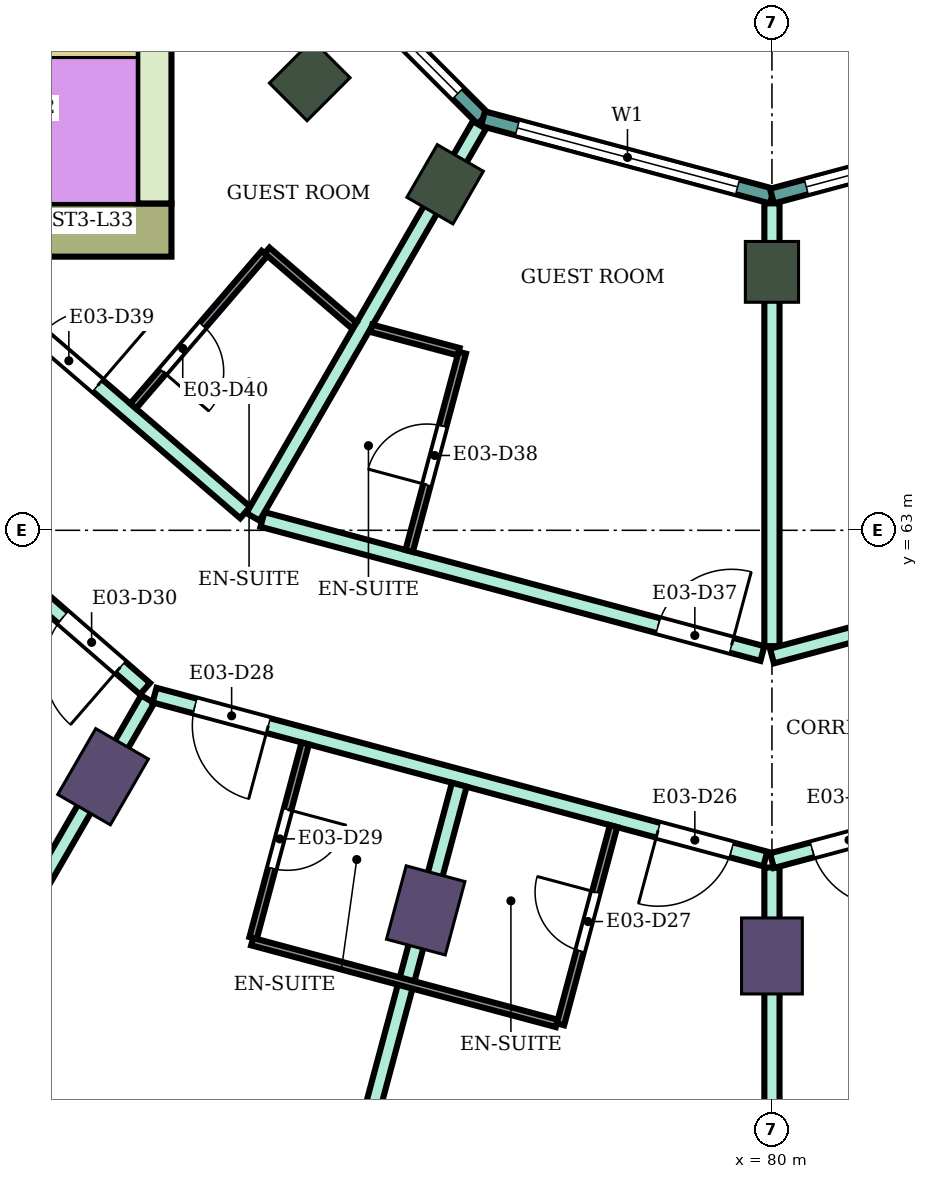
"""IFC4 building model, lengths in metres.
Left out: names, types, materials, properties, quantities, classifications, styles, units other than length and angle.
Written with IfcOpenShell. Run it as: python <this file> out.ifc"""

import sys

from ifc_helpers import new_model, si_unit, direction, frame, frame_2d, origin, origin_2d, place, context, subcontext, project, spatial, rectangle, extrude, element, fill, save


model = new_model("IFC4")
c1 = context("Model", 3, precision=1e-05, world=origin(), true_north=direction((0.0, 1.0)))
c2 = subcontext(c1, "Body", "Model", "MODEL_VIEW")
j1 = project(units=[si_unit("LENGTHUNIT", "METRE"), si_unit("PLANEANGLEUNIT", "RADIAN")], contexts=[c1])
p1 = place(None, origin())
s1 = spatial("IfcSite", under=j1, at=p1, CompositionType="ELEMENT")
p2 = place(p1, origin())
s2 = spatial("IfcBuilding", under=s1, at=p2, CompositionType="ELEMENT")
p3 = place(p2, frame((0.0, 0.0, 141.9)))
s3 = spatial("IfcBuildingStorey", under=s2, at=p3, CompositionType="ELEMENT", Elevation=141.9)
for number, where, z_axis, x_axis in (
    (1, (71.2, 59.758, 0.0), (0.0, 0.0, 1.0), (-0.5, -0.866, 0.0)),
    (2, (75.445, 58.0, 0.0), (0.0, 0.0, 1.0), (-0.259, -0.966, 0.0)),
    (3, (80.0, 57.4, 0.0), (0.0, 0.0, 1.0), (0.0, -1.0, 0.0)),
):
    element("IfcColumn", number, at=place(p3, frame(where, z_axis=z_axis, x_axis=x_axis)), inside=s3, PredefinedType="COLUMN", context=c2, shape_type="SweptSolid", body=[
        extrude(rectangle(XDim=1.0, YDim=0.8, at=origin_2d()), origin(), (0.0, 0.0, 1.0), 3.9),
    ])
for number, where, z_axis, x_axis in (
    (4, (73.919, 68.919, 0.0), (0.0, 0.0, 1.0), (-0.707, -0.707, 0.0)),
    (5, (75.7, 67.552, 0.0), (0.0, 0.0, 1.0), (-0.5, -0.866, 0.0)),
    (6, (80.0, 66.4, 0.0), (0.0, 0.0, 1.0), (0.0, -1.0, 0.0)),
):
    element("IfcColumn", number, at=place(p3, frame(where, z_axis=z_axis, x_axis=x_axis)), inside=s3, PredefinedType="COLUMN", context=c2, shape_type="SweptSolid", body=[
        extrude(rectangle(XDim=0.8, YDim=0.7, at=origin_2d()), origin(), (0.0, 0.0, 1.0), 3.9),
    ])
p4 = place(p3, frame((72.1, 66.95, 0.0), z_axis=(0.0, 0.0, 1.0), x_axis=(-1.0, 0.0, 0.0)))
e7 = element("IfcWall", 7, at=p4, inside=s3, PredefinedType="SHEAR", context=c2, shape_type="SweptSolid", body=[
    extrude(rectangle(XDim=14.8, YDim=0.7, at=frame_2d((7.4, 0.0))), origin(), (0.0, 0.0, 1.0), 3.58),
])
p5 = place(p4, frame((4.2, 0.0, 0.0)))
e8 = element("IfcOpeningElement", 8, at=p5, cuts=e7, PredefinedType="OPENING", context=c2, shape_type="SweptSolid", body=[
    extrude(rectangle(XDim=2.4, YDim=2.4, at=frame_2d((1.2, 1.2))), frame((0.0, 0.36, 0.0), z_axis=(0.0, -1.0, 0.0), x_axis=(1.0, 0.0, 0.0)), (0.0, 0.0, 1.0), 0.72),
])
p6 = place(p3, frame((71.875, 75.0, 0.0), z_axis=(0.0, 0.0, 1.0), x_axis=(0.0, -1.0, 0.0)))
e9 = element("IfcWall", 9, at=p6, inside=s3, PredefinedType="SHEAR", context=c2, shape_type="SweptSolid", body=[
    extrude(rectangle(XDim=7.7, YDim=0.45, at=frame_2d((3.85, 0.0))), origin(), (0.0, 0.0, 1.0), 3.58),
])
p7 = place(p3, frame((73.415, 71.198, 0.0), z_axis=(0.0, 0.0, 1.0), x_axis=(0.707106781187, -0.707106781187, 0.0)))
e10 = element("IfcWall", 10, at=p7, inside=s3, PredefinedType="NOTDEFINED", context=c2, shape_type="SweptSolid", body=[
    extrude(rectangle(XDim=3.936, YDim=0.2, at=frame_2d((1.968, 0.0))), origin(), (0.0, 0.0, 1.0), 3.9),
])
p8 = place(p7, frame((0.468, 0.0, 0.9)))
e11 = element("IfcOpeningElement", 11, at=p8, cuts=e10, PredefinedType="OPENING", context=c2, shape_type="SweptSolid", body=[
    extrude(rectangle(XDim=3.0, YDim=2.3, at=frame_2d((1.5, 1.15))), frame((0.0, 0.11, 0.0), z_axis=(0.0, -1.0, 0.0), x_axis=(1.0, 0.0, 0.0)), (0.0, 0.0, 1.0), 0.22),
])
p9 = place(p3, frame((76.198, 68.415, 0.0), z_axis=(0.0, 0.0, 1.0), x_axis=(0.965933654434, -0.258789828301, 0.0)))
e12 = element("IfcWall", 12, at=p9, inside=s3, PredefinedType="NOTDEFINED", context=c2, shape_type="SweptSolid", body=[
    extrude(rectangle(XDim=3.936, YDim=0.2, at=frame_2d((1.968, 0.0))), origin(), (0.0, 0.0, 1.0), 3.9),
])
p10 = place(p9, frame((0.468, 0.0, 0.9)))
e13 = element("IfcOpeningElement", 13, at=p10, cuts=e12, PredefinedType="OPENING", context=c2, shape_type="SweptSolid", body=[
    extrude(rectangle(XDim=3.0, YDim=2.3, at=frame_2d((1.5, 1.15))), frame((0.0, 0.11, 0.0), z_axis=(0.0, -1.0, 0.0), x_axis=(1.0, 0.0, 0.0)), (0.0, 0.0, 1.0), 0.22),
])
p11 = place(p3, frame((80.0, 67.396, 0.0), z_axis=(0.0, 0.0, 1.0), x_axis=(0.965933654434, 0.258789828301, 0.0)))
e14 = element("IfcWall", 14, at=p11, inside=s3, PredefinedType="NOTDEFINED", context=c2, shape_type="SweptSolid", body=[
    extrude(rectangle(XDim=3.936, YDim=0.2, at=frame_2d((1.968, 0.0))), origin(), (0.0, 0.0, 1.0), 3.9),
])
p12 = place(p11, frame((0.468, 0.0, 0.9)))
e15 = element("IfcOpeningElement", 15, at=p12, cuts=e14, PredefinedType="OPENING", context=c2, shape_type="SweptSolid", body=[
    extrude(rectangle(XDim=3.0, YDim=2.3, at=frame_2d((1.5, 1.15))), frame((0.0, 0.11, 0.0), z_axis=(0.0, -1.0, 0.0), x_axis=(1.0, 0.0, 0.0)), (0.0, 0.0, 1.0), 0.22),
])
p13 = place(p3, frame((67.082, 64.972, 0.0), z_axis=(0.0, 0.0, 1.0), x_axis=(0.755031061605, -0.65568902386, 0.0)))
e16 = element("IfcWall", 16, at=p13, inside=s3, PredefinedType="PARTITIONING", context=c2, shape_type="SweptSolid", body=[
    extrude(rectangle(XDim=6.186, YDim=0.2, at=frame_2d((3.093, 0.0))), origin(), (0.0, 0.0, 1.0), 3.45),
])
p14 = place(p13, frame((4.755, 0.0, 0.0)))
e17 = element("IfcOpeningElement", 17, at=p14, cuts=e16, PredefinedType="OPENING", context=c2, shape_type="SweptSolid", body=[
    extrude(rectangle(XDim=1.0, YDim=2.1, at=frame_2d((0.5, 1.05))), frame((0.0, 0.11, 0.0), z_axis=(0.0, -1.0, 0.0), x_axis=(1.0, 0.0, 0.0)), (0.0, 0.0, 1.0), 0.22),
])
p15 = place(p3, frame((67.097, 52.661, 0.0), z_axis=(0.0, 0.0, 1.0), x_axis=(0.500236379769, 0.865888886841, 0.0)))
e18 = element("IfcWall", 18, at=p15, inside=s3, PredefinedType="PARTITIONING", context=c2, shape_type="SweptSolid", body=[
    extrude(rectangle(XDim=9.375, YDim=0.2, at=frame_2d((4.688, 0.0))), origin(), (0.0, 0.0, 1.0), 3.45),
])
p16 = place(p3, frame((69.158, 66.6, 0.0), z_axis=(0.0, 0.0, 1.0), x_axis=(0.757976058094, -0.652282373943, 0.0)))
e19 = element("IfcWall", 19, at=p16, inside=s3, PredefinedType="PARTITIONING", context=c2, shape_type="SweptSolid", body=[
    extrude(rectangle(XDim=5.16, YDim=0.2, at=frame_2d((2.58, 0.0))), origin(), (0.0, 0.0, 1.0), 3.45),
])
p17 = place(p16, frame((1.6, 0.0, 0.0)))
e20 = element("IfcOpeningElement", 20, at=p17, cuts=e19, PredefinedType="OPENING", context=c2, shape_type="SweptSolid", body=[
    extrude(rectangle(XDim=1.0, YDim=2.1, at=frame_2d((0.5, 1.05))), frame((0.0, 0.11, 0.0), z_axis=(0.0, -1.0, 0.0), x_axis=(1.0, 0.0, 0.0)), (0.0, 0.0, 1.0), 0.22),
])
p18 = place(p3, frame((71.877, 60.832, 0.0), z_axis=(0.0, 0.0, 1.0), x_axis=(0.965852509869, -0.259092510851, 0.0)))
e21 = element("IfcWall", 21, at=p18, inside=s3, PredefinedType="PARTITIONING", context=c2, shape_type="SweptSolid", body=[
    extrude(rectangle(XDim=8.32, YDim=0.2, at=frame_2d((4.16, 0.0))), origin(), (0.0, 0.0, 1.0), 3.45),
])
p19 = place(p18, frame((6.86, 0.0, 0.0)))
e22 = element("IfcOpeningElement", 22, at=p19, cuts=e21, PredefinedType="OPENING", context=c2, shape_type="SweptSolid", body=[
    extrude(rectangle(XDim=1.0, YDim=2.1, at=frame_2d((0.5, 1.05))), frame((0.0, 0.11, 0.0), z_axis=(0.0, -1.0, 0.0), x_axis=(1.0, 0.0, 0.0)), (0.0, 0.0, 1.0), 0.22),
])
p20 = place(p18, frame((0.55, 0.0, 0.0)))
e23 = element("IfcOpeningElement", 23, at=p20, cuts=e21, PredefinedType="OPENING", context=c2, shape_type="SweptSolid", body=[
    extrude(rectangle(XDim=1.0, YDim=2.1, at=frame_2d((0.5, 1.05))), frame((0.0, 0.11, 0.0), z_axis=(0.0, -1.0, 0.0), x_axis=(1.0, 0.0, 0.0)), (0.0, 0.0, 1.0), 0.22),
])
p21 = place(p3, frame((73.297, 63.143, 0.0), z_axis=(0.0, 0.0, 1.0), x_axis=(0.965859030528, -0.25906820173, 0.0)))
e24 = element("IfcWall", 24, at=p21, inside=s3, PredefinedType="PARTITIONING", context=c2, shape_type="SweptSolid", body=[
    extrude(rectangle(XDim=6.81, YDim=0.2, at=frame_2d((3.405, 0.0))), origin(), (0.0, 0.0, 1.0), 3.45),
])
p22 = place(p21, frame((5.39, 0.0, 0.0)))
e25 = element("IfcOpeningElement", 25, at=p22, cuts=e24, PredefinedType="OPENING", context=c2, shape_type="SweptSolid", body=[
    extrude(rectangle(XDim=1.0, YDim=2.1, at=frame_2d((0.5, 1.05))), frame((0.0, 0.11, 0.0), z_axis=(0.0, -1.0, 0.0), x_axis=(1.0, 0.0, 0.0)), (0.0, 0.0, 1.0), 0.22),
])
p23 = place(p3, frame((73.173, 63.176, 0.0), z_axis=(0.0, 0.0, 1.0), x_axis=(0.500239348149, 0.865887171959, 0.0)))
e26 = element("IfcWall", 26, at=p23, inside=s3, PredefinedType="PARTITIONING", context=c2, shape_type="SweptSolid", body=[
    extrude(rectangle(XDim=5.955, YDim=0.2, at=frame_2d((2.978, 0.0))), origin(), (0.0, 0.0, 1.0), 3.45),
])
p24 = place(p3, frame((73.321, 50.081, 0.0), z_axis=(0.0, 0.0, 1.0), x_axis=(0.258889198551, 0.965907025999, 0.0)))
e27 = element("IfcWall", 27, at=p24, inside=s3, PredefinedType="PARTITIONING", context=c2, shape_type="SweptSolid", body=[
    extrude(rectangle(XDim=9.909, YDim=0.2, at=frame_2d((4.955, 0.0))), origin(), (0.0, 0.0, 1.0), 3.45),
])
p25 = place(p3, frame((80.0, 51.8, 0.0), z_axis=(0.0, 0.0, 1.0), x_axis=(0.0, 1.0, 0.0)))
e28 = element("IfcWall", 28, at=p25, inside=s3, PredefinedType="PARTITIONING", context=c2, shape_type="SweptSolid", body=[
    extrude(rectangle(XDim=6.764, YDim=0.2, at=frame_2d((3.382, 0.0))), origin(), (0.0, 0.0, 1.0), 3.45),
])
p26 = place(p3, frame((80.0, 58.654, 0.0), z_axis=(0.0, 0.0, 1.0), x_axis=(0.965979808777, 0.25861749561, 0.0)))
e29 = element("IfcWall", 29, at=p26, inside=s3, PredefinedType="PARTITIONING", context=c2, shape_type="SweptSolid", body=[
    extrude(rectangle(XDim=8.37, YDim=0.2, at=frame_2d((4.185, 0.0))), origin(), (0.0, 0.0, 1.0), 3.45),
])
p27 = place(p26, frame((0.55, 0.0, 0.0)))
e30 = element("IfcOpeningElement", 30, at=p27, cuts=e29, PredefinedType="OPENING", context=c2, shape_type="SweptSolid", body=[
    extrude(rectangle(XDim=1.0, YDim=2.1, at=frame_2d((0.5, 1.05))), frame((0.0, 0.11, 0.0), z_axis=(0.0, -1.0, 0.0), x_axis=(1.0, 0.0, 0.0)), (0.0, 0.0, 1.0), 0.22),
])
p28 = place(p3, frame((80.0, 61.476, 0.0), z_axis=(0.0, 0.0, 1.0), x_axis=(0.0, 1.0, 0.0)))
e31 = element("IfcWall", 31, at=p28, inside=s3, PredefinedType="PARTITIONING", context=c2, shape_type="SweptSolid", body=[
    extrude(rectangle(XDim=5.825, YDim=0.2, at=frame_2d((2.913, 0.0))), origin(), (0.0, 0.0, 1.0), 3.45),
])
p29 = place(p3, frame((80.0, 61.346, 0.0), z_axis=(0.0, 0.0, 1.0), x_axis=(0.965915385935, 0.25885800589, 0.0)))
e32 = element("IfcWall", 32, at=p29, inside=s3, PredefinedType="PARTITIONING", context=c2, shape_type="SweptSolid", body=[
    extrude(rectangle(XDim=6.94, YDim=0.2, at=frame_2d((3.47, 0.0))), origin(), (0.0, 0.0, 1.0), 3.45),
])
p30 = place(p29, frame((3.094, 0.0, 0.0)))
e33 = element("IfcOpeningElement", 33, at=p30, cuts=e32, PredefinedType="OPENING", context=c2, shape_type="SweptSolid", body=[
    extrude(rectangle(XDim=0.9, YDim=2.1, at=frame_2d((0.45, 1.05))), frame((0.0, 0.11, 0.0), z_axis=(0.0, -1.0, 0.0), x_axis=(1.0, 0.0, 0.0)), (0.0, 0.0, 1.0), 0.22),
])
p31 = place(p3, frame((71.596, 64.635, 0.0), z_axis=(0.0, 0.0, 1.0), x_axis=(0.652285007511, 0.757973791748, 0.0)))
e34 = element("IfcWall", 34, at=p31, inside=s3, PredefinedType="PARTITIONING", context=c2, shape_type="SweptSolid", body=[
    extrude(rectangle(XDim=2.65, YDim=0.1, at=frame_2d((1.325, 0.0))), origin(), (0.0, 0.0, 1.0), 3.45),
])
p32 = place(p31, frame((0.6, 0.0, 0.0)))
e35 = element("IfcOpeningElement", 35, at=p32, cuts=e34, PredefinedType="OPENING", context=c2, shape_type="SweptSolid", body=[
    extrude(rectangle(XDim=0.8, YDim=2.1, at=frame_2d((0.4, 1.05))), frame((0.0, 0.06, 0.0), z_axis=(0.0, -1.0, 0.0), x_axis=(1.0, 0.0, 0.0)), (0.0, 0.0, 1.0), 0.12),
])
p33 = place(p3, frame((73.174, 57.636, 0.0), z_axis=(0.0, 0.0, 1.0), x_axis=(0.258952498977, 0.96589005755, 0.0)))
e36 = element("IfcWall", 36, at=p33, inside=s3, PredefinedType="PARTITIONING", context=c2, shape_type="SweptSolid", body=[
    extrude(rectangle(XDim=2.65, YDim=0.1, at=frame_2d((1.325, 0.0))), origin(), (0.0, 0.0, 1.0), 3.45),
])
p34 = place(p33, frame((0.95, 0.0, 0.0)))
e37 = element("IfcOpeningElement", 37, at=p34, cuts=e36, PredefinedType="OPENING", context=c2, shape_type="SweptSolid", body=[
    extrude(rectangle(XDim=0.8, YDim=2.1, at=frame_2d((0.4, 1.05))), frame((0.0, 0.06, 0.0), z_axis=(0.0, -1.0, 0.0), x_axis=(1.0, 0.0, 0.0)), (0.0, 0.0, 1.0), 0.12),
])
p35 = place(p3, frame((73.161, 57.588, 0.0), z_axis=(0.0, 0.0, 1.0), x_axis=(0.965858994467, -0.259068336173, 0.0)))
e38 = element("IfcWall", 38, at=p35, inside=s3, PredefinedType="PARTITIONING", context=c2, shape_type="SweptSolid", body=[
    extrude(rectangle(XDim=4.15, YDim=0.1, at=frame_2d((2.075, 0.0))), origin(), (0.0, 0.0, 1.0), 3.45),
])
p36 = place(p3, frame((73.357, 66.681, 0.0), z_axis=(0.0, 0.0, 1.0), x_axis=(0.758263469747, -0.651948242154, 0.0)))
e39 = element("IfcWall", 39, at=p36, inside=s3, PredefinedType="PARTITIONING", context=c2, shape_type="SweptSolid", body=[
    extrude(rectangle(XDim=1.511, YDim=0.1, at=frame_2d((0.755, 0.0))), origin(), (0.0, 0.0, 1.0), 3.45),
])
p37 = place(p3, frame((74.729, 65.657, 0.0), z_axis=(0.0, 0.0, 1.0), x_axis=(0.965948051503, -0.258736085224, 0.0)))
e40 = element("IfcWall", 40, at=p37, inside=s3, PredefinedType="PARTITIONING", context=c2, shape_type="SweptSolid", body=[
    extrude(rectangle(XDim=1.189, YDim=0.1, at=frame_2d((0.594, 0.0))), origin(), (0.0, 0.0, 1.0), 3.45),
])
p38 = place(p3, frame((75.227, 62.729, 0.0), z_axis=(0.0, 0.0, 1.0), x_axis=(0.258945475746, 0.965891940432, 0.0)))
e41 = element("IfcWall", 41, at=p38, inside=s3, PredefinedType="PARTITIONING", context=c2, shape_type="SweptSolid", body=[
    extrude(rectangle(XDim=2.7, YDim=0.1, at=frame_2d((1.35, 0.0))), origin(), (0.0, 0.0, 1.0), 3.45),
])
p39 = place(p38, frame((0.9, 0.0, 0.0)))
e42 = element("IfcOpeningElement", 42, at=p39, cuts=e41, PredefinedType="OPENING", context=c2, shape_type="SweptSolid", body=[
    extrude(rectangle(XDim=0.8, YDim=2.1, at=frame_2d((0.4, 1.05))), frame((0.0, 0.06, 0.0), z_axis=(0.0, -1.0, 0.0), x_axis=(1.0, 0.0, 0.0)), (0.0, 0.0, 1.0), 0.12),
])
p40 = place(p3, frame((77.218, 56.501, 0.0), z_axis=(0.0, 0.0, 1.0), x_axis=(0.258591408257, 0.965986792651, 0.0)))
e43 = element("IfcWall", 43, at=p40, inside=s3, PredefinedType="PARTITIONING", context=c2, shape_type="SweptSolid", body=[
    extrude(rectangle(XDim=2.699, YDim=0.1, at=frame_2d((1.35, 0.0))), origin(), (0.0, 0.0, 1.0), 3.45),
])
p41 = place(p40, frame((1.0, 0.0, 0.0)))
e44 = element("IfcOpeningElement", 44, at=p41, cuts=e43, PredefinedType="OPENING", context=c2, shape_type="SweptSolid", body=[
    extrude(rectangle(XDim=0.8, YDim=2.1, at=frame_2d((0.4, 1.05))), frame((0.0, 0.06, 0.0), z_axis=(0.0, -1.0, 0.0), x_axis=(1.0, 0.0, 0.0)), (0.0, 0.0, 1.0), 0.12),
])
p42 = place(p8, origin())
e45 = element("IfcWindow", 45, at=p42, inside=s3, PartitioningType="SINGLE_PANEL", PredefinedType="WINDOW", context=c2, shape_type="SweptSolid", body=[
    extrude(rectangle(XDim=3.0, YDim=2.3, at=frame_2d((1.5, 1.15))), frame((0.0, 0.03, 0.0), z_axis=(0.0, -1.0, 0.0), x_axis=(1.0, 0.0, 0.0)), (0.0, 0.0, 1.0), 0.06),
])
fill(e11, e45)
p43 = place(p10, origin())
e46 = element("IfcWindow", 46, at=p43, inside=s3, PartitioningType="SINGLE_PANEL", PredefinedType="WINDOW", context=c2, shape_type="SweptSolid", body=[
    extrude(rectangle(XDim=3.0, YDim=2.3, at=frame_2d((1.5, 1.15))), frame((0.0, 0.03, 0.0), z_axis=(0.0, -1.0, 0.0), x_axis=(1.0, 0.0, 0.0)), (0.0, 0.0, 1.0), 0.06),
])
fill(e13, e46)
p44 = place(p12, origin())
e47 = element("IfcWindow", 47, at=p44, inside=s3, PartitioningType="SINGLE_PANEL", PredefinedType="WINDOW", context=c2, shape_type="SweptSolid", body=[
    extrude(rectangle(XDim=3.0, YDim=2.3, at=frame_2d((1.5, 1.15))), frame((0.0, 0.03, 0.0), z_axis=(0.0, -1.0, 0.0), x_axis=(1.0, 0.0, 0.0)), (0.0, 0.0, 1.0), 0.06),
])
fill(e15, e47)
p45 = place(p27, frame((1.0, 0.0, 0.0), z_axis=(0.0, 0.0, 1.0), x_axis=(-1.0, 0.0, 0.0)))
e48 = element("IfcDoor", 48, at=p45, inside=s3, OperationType="SINGLE_SWING_LEFT", PredefinedType="DOOR", context=c2, shape_type="SweptSolid", body=[
    extrude(rectangle(XDim=1.0, YDim=2.1, at=frame_2d((0.5, 1.05))), frame((0.0, 0.025, 0.0), z_axis=(0.0, -1.0, 0.0), x_axis=(1.0, 0.0, 0.0)), (0.0, 0.0, 1.0), 0.05),
])
fill(e30, e48)
p46 = place(p19, frame((1.0, 0.0, 0.0), z_axis=(0.0, 0.0, 1.0), x_axis=(-1.0, 0.0, 0.0)))
e49 = element("IfcDoor", 49, at=p46, inside=s3, OperationType="SINGLE_SWING_RIGHT", PredefinedType="DOOR", context=c2, shape_type="SweptSolid", body=[
    extrude(rectangle(XDim=1.0, YDim=2.1, at=frame_2d((0.5, 1.05))), frame((0.0, 0.025, 0.0), z_axis=(0.0, -1.0, 0.0), x_axis=(1.0, 0.0, 0.0)), (0.0, 0.0, 1.0), 0.05),
])
fill(e22, e49)
p47 = place(p41, origin())
e50 = element("IfcDoor", 50, at=p47, inside=s3, OperationType="SINGLE_SWING_RIGHT", PredefinedType="DOOR", context=c2, shape_type="SweptSolid", body=[
    extrude(rectangle(XDim=0.8, YDim=2.1, at=frame_2d((0.4, 1.05))), frame((0.0, 0.025, 0.0), z_axis=(0.0, -1.0, 0.0), x_axis=(1.0, 0.0, 0.0)), (0.0, 0.0, 1.0), 0.05),
])
fill(e44, e50)
p48 = place(p20, frame((1.0, 0.0, 0.0), z_axis=(0.0, 0.0, 1.0), x_axis=(-1.0, 0.0, 0.0)))
e51 = element("IfcDoor", 51, at=p48, inside=s3, OperationType="SINGLE_SWING_LEFT", PredefinedType="DOOR", context=c2, shape_type="SweptSolid", body=[
    extrude(rectangle(XDim=1.0, YDim=2.1, at=frame_2d((0.5, 1.05))), frame((0.0, 0.025, 0.0), z_axis=(0.0, -1.0, 0.0), x_axis=(1.0, 0.0, 0.0)), (0.0, 0.0, 1.0), 0.05),
])
fill(e23, e51)
p49 = place(p34, frame((0.8, 0.0, 0.0), z_axis=(0.0, 0.0, 1.0), x_axis=(-1.0, 0.0, 0.0)))
e52 = element("IfcDoor", 52, at=p49, inside=s3, OperationType="SINGLE_SWING_LEFT", PredefinedType="DOOR", context=c2, shape_type="SweptSolid", body=[
    extrude(rectangle(XDim=0.8, YDim=2.1, at=frame_2d((0.4, 1.05))), frame((0.0, 0.025, 0.0), z_axis=(0.0, -1.0, 0.0), x_axis=(1.0, 0.0, 0.0)), (0.0, 0.0, 1.0), 0.05),
])
fill(e37, e52)
p50 = place(p14, frame((1.0, 0.0, 0.0), z_axis=(0.0, 0.0, 1.0), x_axis=(-1.0, 0.0, 0.0)))
e53 = element("IfcDoor", 53, at=p50, inside=s3, OperationType="SINGLE_SWING_LEFT", PredefinedType="DOOR", context=c2, shape_type="SweptSolid", body=[
    extrude(rectangle(XDim=1.0, YDim=2.1, at=frame_2d((0.5, 1.05))), frame((0.0, 0.025, 0.0), z_axis=(0.0, -1.0, 0.0), x_axis=(1.0, 0.0, 0.0)), (0.0, 0.0, 1.0), 0.05),
])
fill(e17, e53)
p51 = place(p22, origin())
e54 = element("IfcDoor", 54, at=p51, inside=s3, OperationType="SINGLE_SWING_RIGHT", PredefinedType="DOOR", context=c2, shape_type="SweptSolid", body=[
    extrude(rectangle(XDim=1.0, YDim=2.1, at=frame_2d((0.5, 1.05))), frame((0.0, 0.025, 0.0), z_axis=(0.0, -1.0, 0.0), x_axis=(1.0, 0.0, 0.0)), (0.0, 0.0, 1.0), 0.05),
])
fill(e25, e54)
p52 = place(p39, origin())
e55 = element("IfcDoor", 55, at=p52, inside=s3, OperationType="SINGLE_SWING_LEFT", PredefinedType="DOOR", context=c2, shape_type="SweptSolid", body=[
    extrude(rectangle(XDim=0.8, YDim=2.1, at=frame_2d((0.4, 1.05))), frame((0.0, 0.025, 0.0), z_axis=(0.0, -1.0, 0.0), x_axis=(1.0, 0.0, 0.0)), (0.0, 0.0, 1.0), 0.05),
])
fill(e42, e55)
p53 = place(p17, origin())
e56 = element("IfcDoor", 56, at=p53, inside=s3, OperationType="SINGLE_SWING_RIGHT", PredefinedType="DOOR", context=c2, shape_type="SweptSolid", body=[
    extrude(rectangle(XDim=1.0, YDim=2.1, at=frame_2d((0.5, 1.05))), frame((0.0, 0.025, 0.0), z_axis=(0.0, -1.0, 0.0), x_axis=(1.0, 0.0, 0.0)), (0.0, 0.0, 1.0), 0.05),
])
fill(e20, e56)
p54 = place(p32, frame((0.8, 0.0, 0.0), z_axis=(0.0, 0.0, 1.0), x_axis=(-1.0, 0.0, 0.0)))
e57 = element("IfcDoor", 57, at=p54, inside=s3, OperationType="SINGLE_SWING_RIGHT", PredefinedType="DOOR", context=c2, shape_type="SweptSolid", body=[
    extrude(rectangle(XDim=0.8, YDim=2.1, at=frame_2d((0.4, 1.05))), frame((0.0, 0.025, 0.0), z_axis=(0.0, -1.0, 0.0), x_axis=(1.0, 0.0, 0.0)), (0.0, 0.0, 1.0), 0.05),
])
fill(e35, e57)
save(model, sys.argv[1])
